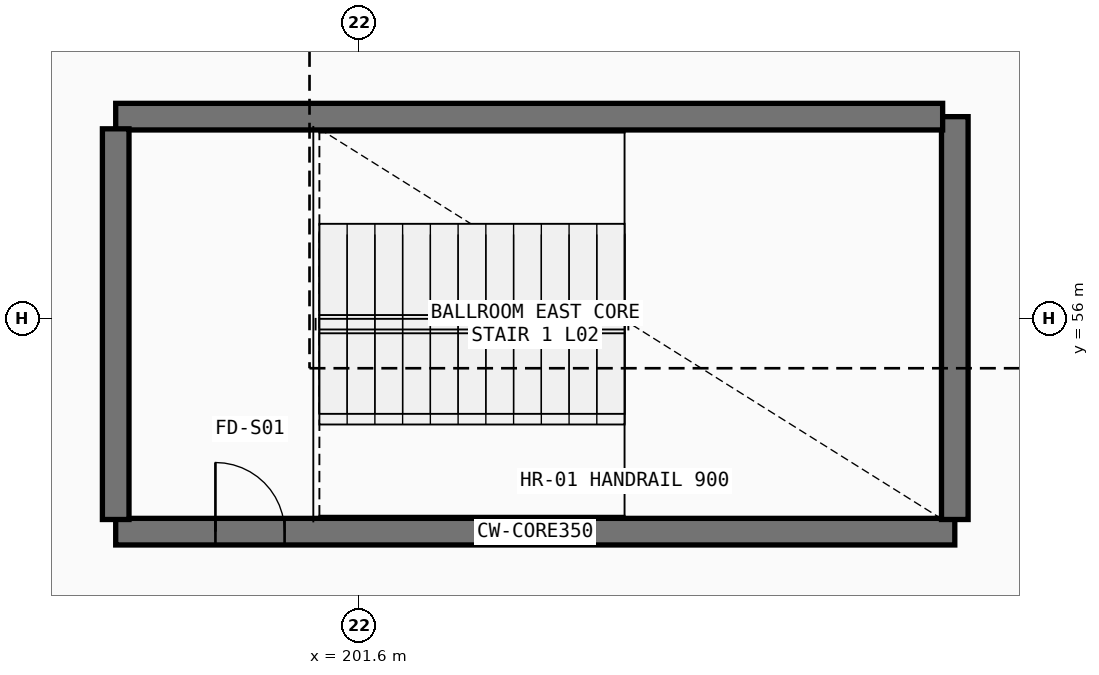
"""IFC4 building model, lengths in metres.
Left out: names, types, materials, properties, quantities, classifications, styles, units other than length and angle.
Written with IfcOpenShell. Run it as: python <this file> out.ifc"""

import sys

from ifc_helpers import new_model, si_unit, direction, frame, frame_2d, origin, place, context, subcontext, project, spatial, rectangle, extrude, element, fill, save


model = new_model("IFC4")
c1 = context("Model", 3, precision=1e-05, world=origin(), true_north=direction((0.0, 1.0)))
c2 = subcontext(c1, "Body", "Model", "MODEL_VIEW")
j1 = project(units=[si_unit("LENGTHUNIT", "METRE"), si_unit("PLANEANGLEUNIT", "RADIAN")], contexts=[c1])
p1 = place(None, origin())
s1 = spatial("IfcSite", under=j1, at=p1, CompositionType="ELEMENT")
p2 = place(p1, origin())
s2 = spatial("IfcBuilding", under=s1, at=p2, CompositionType="ELEMENT")
p3 = place(p2, frame((0.0, 0.0, 11.4)))
s3 = spatial("IfcBuildingStorey", under=s2, at=p3, CompositionType="ELEMENT", Elevation=11.4)
p4 = place(p3, frame((198.4, 53.2, 0.0), z_axis=(0.0, 0.0, 1.0), x_axis=(1.0, 0.0, 0.0)))
e1 = element("IfcWall", 1, at=p4, inside=s3, PredefinedType="SHEAR", context=c2, shape_type="SweptSolid", body=[
    extrude(rectangle(XDim=11.04, YDim=0.35, at=frame_2d((5.52, 0.0))), origin(), (0.0, 0.0, 1.0), 4.27),
])
p5 = place(p4, frame((1.312, 0.0, 0.0)))
e2 = element("IfcOpeningElement", 2, at=p5, cuts=e1, PredefinedType="OPENING", context=c2, shape_type="SweptSolid", body=[
    extrude(rectangle(XDim=0.91, YDim=2.08, at=frame_2d((0.455, 1.04))), frame((0.0, 0.185, 0.0), z_axis=(0.0, -1.0, 0.0), x_axis=(1.0, 0.0, 0.0)), (0.0, 0.0, 1.0), 0.37),
])
p6 = place(p3, frame((209.44, 53.36, 0.0), z_axis=(0.0, 0.0, 1.0), x_axis=(0.0, 1.0, 0.0)))
e3 = element("IfcWall", 3, at=p6, inside=s3, PredefinedType="SHEAR", context=c2, shape_type="SweptSolid", body=[
    extrude(rectangle(XDim=5.3, YDim=0.35, at=frame_2d((2.65, 0.0))), origin(), (0.0, 0.0, 1.0), 4.27),
])
p7 = place(p3, frame((209.28, 58.66, 0.0), z_axis=(0.0, 0.0, 1.0), x_axis=(-1.0, 0.0, 0.0)))
e4 = element("IfcWall", 4, at=p7, inside=s3, PredefinedType="SHEAR", context=c2, shape_type="SweptSolid", body=[
    extrude(rectangle(XDim=10.88, YDim=0.35, at=frame_2d((5.44, 0.0))), origin(), (0.0, 0.0, 1.0), 4.27),
])
p8 = place(p3, frame((198.4, 58.5, 0.0), z_axis=(0.0, 0.0, 1.0), x_axis=(0.0, -1.0, 0.0)))
e5 = element("IfcWall", 5, at=p8, inside=s3, PredefinedType="SHEAR", context=c2, shape_type="SweptSolid", body=[
    extrude(rectangle(XDim=5.14, YDim=0.35, at=frame_2d((2.57, 0.0))), origin(), (0.0, 0.0, 1.0), 4.27),
])
p9 = place(p5, origin())
e6 = element("IfcDoor", 6, at=p9, inside=s3, OperationType="SINGLE_SWING_LEFT", PredefinedType="DOOR", context=c2, shape_type="SweptSolid", body=[
    extrude(rectangle(XDim=0.91, YDim=2.08, at=frame_2d((0.455, 1.04))), frame((0.0, 0.025, 0.0), z_axis=(0.0, -1.0, 0.0), x_axis=(1.0, 0.0, 0.0)), (0.0, 0.0, 1.0), 0.05),
])
fill(e2, e6)
save(model, sys.argv[1])
